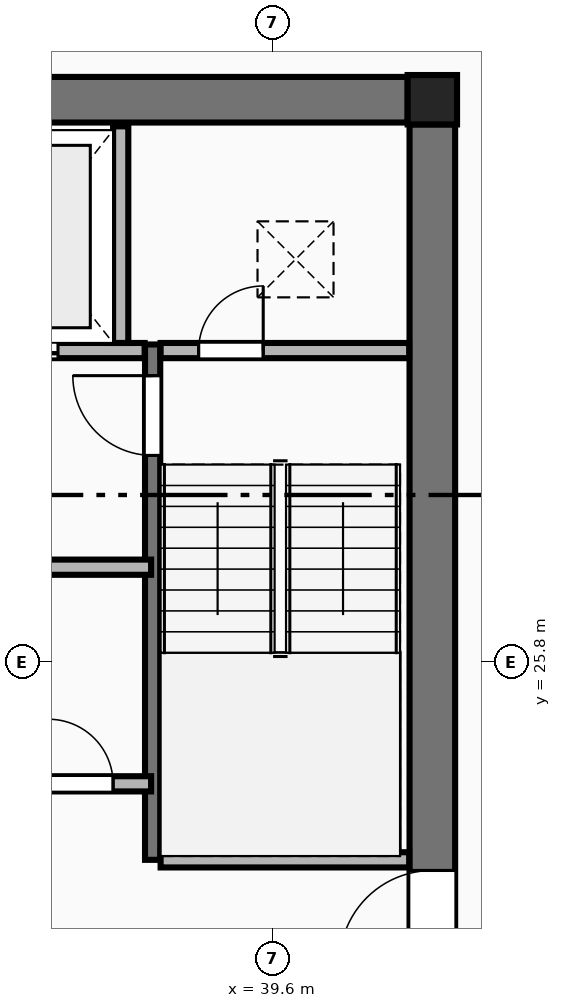
"""IFC4 building model, lengths in metres.
Left out: names, types, materials, properties, quantities, classifications, styles, units other than length and angle.
Written with IfcOpenShell. Run it as: python <this file> out.ifc"""

import sys

from ifc_helpers import new_model, si_unit, direction, frame, frame_2d, origin, origin_2d, place, context, subcontext, project, spatial, rectangle, extrude, element, fill, save


model = new_model("IFC4")
c1 = context("Model", 3, precision=1e-05, world=origin(), true_north=direction((0.0, 1.0)))
c2 = subcontext(c1, "Body", "Model", "MODEL_VIEW")
j1 = project(units=[si_unit("LENGTHUNIT", "METRE"), si_unit("PLANEANGLEUNIT", "RADIAN")], contexts=[c1])
p1 = place(None, origin())
s1 = spatial("IfcSite", under=j1, at=p1, CompositionType="ELEMENT")
p2 = place(p1, origin())
s2 = spatial("IfcBuilding", under=s1, at=p2, CompositionType="ELEMENT")
p3 = place(p2, frame((0.0, 0.0, 214.5)))
s3 = spatial("IfcBuildingStorey", under=s2, at=p3, CompositionType="ELEMENT", Elevation=214.5)
p4 = place(p3, frame((41.7, 33.2, 0.0), z_axis=(0.0, 0.0, 1.0), x_axis=(1.0, 0.0, 0.0)))
e1 = element("IfcColumn", 1, at=p4, inside=s3, PredefinedType="COLUMN", context=c2, shape_type="SweptSolid", body=[
    extrude(rectangle(XDim=0.65, YDim=0.65, at=origin_2d()), origin(), (0.0, 0.0, 1.0), 3.55),
])
p5 = place(p3, frame((23.425, 33.2, 0.0), z_axis=(0.0, 0.0, 1.0), x_axis=(1.0, 0.0, 0.0)))
e2 = element("IfcWall", 2, at=p5, inside=s3, PredefinedType="SHEAR", context=c2, shape_type="SweptSolid", body=[
    extrude(rectangle(XDim=17.95, YDim=0.6, at=frame_2d((8.975, 0.0))), origin(), (0.0, 0.0, 1.0), 3.35),
])
p6 = place(p3, frame((41.7, 18.925, 0.0), z_axis=(0.0, 0.0, 1.0), x_axis=(0.0, 1.0, 0.0)))
e3 = element("IfcWall", 3, at=p6, inside=s3, PredefinedType="SHEAR", context=c2, shape_type="SweptSolid", body=[
    extrude(rectangle(XDim=13.95, YDim=0.6, at=frame_2d((6.975, 0.0))), origin(), (0.0, 0.0, 1.0), 3.35),
])
p7 = place(p6, frame((2.915, 0.0, 0.0)))
e4 = element("IfcOpeningElement", 4, at=p7, cuts=e3, PredefinedType="OPENING", context=c2, shape_type="SweptSolid", body=[
    extrude(rectangle(XDim=1.22, YDim=2.25, at=frame_2d((0.61, 1.125))), frame((0.0, 0.31, 0.0), z_axis=(0.0, -1.0, 0.0), x_axis=(1.0, 0.0, 0.0)), (0.0, 0.0, 1.0), 0.62),
])
p8 = place(p3, frame((38.02, 23.2, 0.0), z_axis=(0.0, 0.0, 1.0), x_axis=(0.0, 1.0, 0.0)))
e5 = element("IfcWall", 5, at=p8, inside=s3, PredefinedType="SHEAR", context=c2, shape_type="SweptSolid", body=[
    extrude(rectangle(XDim=6.78, YDim=0.2, at=frame_2d((3.39, 0.0))), origin(), (0.0, 0.0, 1.0), 3.55),
])
p9 = place(p8, frame((5.32, 0.0, 0.0)))
e6 = element("IfcOpeningElement", 6, at=p9, cuts=e5, PredefinedType="OPENING", context=c2, shape_type="SweptSolid", body=[
    extrude(rectangle(XDim=1.05, YDim=2.15, at=frame_2d((0.525, 1.075))), frame((0.0, 0.11, 0.0), z_axis=(0.0, -1.0, 0.0), x_axis=(1.0, 0.0, 0.0)), (0.0, 0.0, 1.0), 0.22),
])
p10 = place(p3, frame((38.125, 23.2, 0.0), z_axis=(0.0, 0.0, 1.0), x_axis=(1.0, 0.0, 0.0)))
e7 = element("IfcWall", 7, at=p10, inside=s3, PredefinedType="PLUMBINGWALL", context=c2, shape_type="SweptSolid", body=[
    extrude(rectangle(XDim=3.27, YDim=0.2, at=frame_2d((1.635, 0.0))), origin(), (0.0, 0.0, 1.0), 3.35),
])
p11 = place(p3, frame((34.9, 29.9, 0.0), z_axis=(0.0, 0.0, 1.0), x_axis=(1.0, 0.0, 0.0)))
e8 = element("IfcWall", 8, at=p11, inside=s3, PredefinedType="PLUMBINGWALL", context=c2, shape_type="SweptSolid", body=[
    extrude(rectangle(XDim=3.015, YDim=0.2, at=frame_2d((1.508, 0.0))), origin(), (0.0, 0.0, 1.0), 3.35),
])
p12 = place(p11, frame((0.725, 0.0, 0.0)))
e9 = element("IfcOpeningElement", 9, at=p12, cuts=e8, PredefinedType="OPENING", context=c2, shape_type="SweptSolid", body=[
    extrude(rectangle(XDim=1.15, YDim=2.2, at=frame_2d((0.575, 1.1))), frame((0.0, 0.11, 0.0), z_axis=(0.0, -1.0, 0.0), x_axis=(1.0, 0.0, 0.0)), (0.0, 0.0, 1.0), 0.22),
])
p13 = place(p3, frame((38.125, 29.9, 0.0), z_axis=(0.0, 0.0, 1.0), x_axis=(1.0, 0.0, 0.0)))
e10 = element("IfcWall", 10, at=p13, inside=s3, PredefinedType="PLUMBINGWALL", context=c2, shape_type="SweptSolid", body=[
    extrude(rectangle(XDim=3.27, YDim=0.2, at=frame_2d((1.635, 0.0))), origin(), (0.0, 0.0, 1.0), 3.35),
])
p14 = place(p13, frame((0.5, 0.0, 0.0)))
e11 = element("IfcOpeningElement", 11, at=p14, cuts=e10, PredefinedType="OPENING", context=c2, shape_type="SweptSolid", body=[
    extrude(rectangle(XDim=0.85, YDim=2.05, at=frame_2d((0.425, 1.025))), frame((0.0, 0.11, 0.0), z_axis=(0.0, -1.0, 0.0), x_axis=(1.0, 0.0, 0.0)), (0.0, 0.0, 1.0), 0.22),
])
p15 = place(p3, frame((37.6, 30.0, 0.0), z_axis=(0.0, 0.0, 1.0), x_axis=(0.0, 1.0, 0.0)))
e12 = element("IfcWall", 12, at=p15, inside=s3, PredefinedType="PLUMBINGWALL", context=c2, shape_type="SweptSolid", body=[
    extrude(rectangle(XDim=2.85, YDim=0.2, at=frame_2d((1.425, 0.0))), origin(), (0.0, 0.0, 1.0), 3.35),
])
p16 = place(p3, frame((34.8, 27.05, 0.0), z_axis=(0.0, 0.0, 1.0), x_axis=(1.0, 0.0, 0.0)))
e13 = element("IfcWall", 13, at=p16, inside=s3, PredefinedType="PLUMBINGWALL", context=c2, shape_type="SweptSolid", body=[
    extrude(rectangle(XDim=3.2, YDim=0.2, at=frame_2d((1.6, 0.0))), origin(), (0.0, 0.0, 1.0), 3.35),
])
p17 = place(p3, frame((31.2, 24.2, 0.0), z_axis=(0.0, 0.0, 1.0), x_axis=(1.0, 0.0, 0.0)))
e14 = element("IfcWall", 14, at=p17, inside=s3, PredefinedType="PLUMBINGWALL", context=c2, shape_type="SweptSolid", body=[
    extrude(rectangle(XDim=6.8, YDim=0.2, at=frame_2d((3.4, 0.0))), origin(), (0.0, 0.0, 1.0), 3.35),
])
p18 = place(p17, frame((0.65, 0.0, 0.0)))
e15 = element("IfcOpeningElement", 15, at=p18, cuts=e14, PredefinedType="OPENING", context=c2, shape_type="SweptSolid", body=[
    extrude(rectangle(XDim=1.1, YDim=2.2, at=frame_2d((0.55, 1.1))), frame((0.0, 0.11, 0.0), z_axis=(0.0, -1.0, 0.0), x_axis=(1.0, 0.0, 0.0)), (0.0, 0.0, 1.0), 0.22),
])
p19 = place(p17, frame((2.55, 0.0, 0.0)))
e16 = element("IfcOpeningElement", 16, at=p19, cuts=e14, PredefinedType="OPENING", context=c2, shape_type="SweptSolid", body=[
    extrude(rectangle(XDim=0.85, YDim=2.05, at=frame_2d((0.425, 1.025))), frame((0.0, 0.11, 0.0), z_axis=(0.0, -1.0, 0.0), x_axis=(1.0, 0.0, 0.0)), (0.0, 0.0, 1.0), 0.22),
])
p20 = place(p17, frame((4.0, 0.0, 0.0)))
e17 = element("IfcOpeningElement", 17, at=p20, cuts=e14, PredefinedType="OPENING", context=c2, shape_type="SweptSolid", body=[
    extrude(rectangle(XDim=0.85, YDim=2.05, at=frame_2d((0.425, 1.025))), frame((0.0, 0.11, 0.0), z_axis=(0.0, -1.0, 0.0), x_axis=(1.0, 0.0, 0.0)), (0.0, 0.0, 1.0), 0.22),
])
p21 = place(p17, frame((5.45, 0.0, 0.0)))
e18 = element("IfcOpeningElement", 18, at=p21, cuts=e14, PredefinedType="OPENING", context=c2, shape_type="SweptSolid", body=[
    extrude(rectangle(XDim=0.85, YDim=2.05, at=frame_2d((0.425, 1.025))), frame((0.0, 0.11, 0.0), z_axis=(0.0, -1.0, 0.0), x_axis=(1.0, 0.0, 0.0)), (0.0, 0.0, 1.0), 0.22),
])
p22 = place(p7, origin())
e19 = element("IfcDoor", 19, at=p22, inside=s3, OperationType="SINGLE_SWING_LEFT", PredefinedType="DOOR", context=c2, shape_type="SweptSolid", body=[
    extrude(rectangle(XDim=1.22, YDim=2.25, at=frame_2d((0.61, 1.125))), frame((0.0, 0.025, 0.0), z_axis=(0.0, -1.0, 0.0), x_axis=(1.0, 0.0, 0.0)), (0.0, 0.0, 1.0), 0.05),
])
fill(e4, e19)
p23 = place(p9, origin())
e20 = element("IfcDoor", 20, at=p23, inside=s3, OperationType="SINGLE_SWING_RIGHT", PredefinedType="DOOR", context=c2, shape_type="SweptSolid", body=[
    extrude(rectangle(XDim=1.05, YDim=2.15, at=frame_2d((0.525, 1.075))), frame((0.0, 0.025, 0.0), z_axis=(0.0, -1.0, 0.0), x_axis=(1.0, 0.0, 0.0)), (0.0, 0.0, 1.0), 0.05),
])
fill(e6, e20)
p24 = place(p14, origin())
e21 = element("IfcDoor", 21, at=p24, inside=s3, OperationType="SINGLE_SWING_RIGHT", PredefinedType="DOOR", context=c2, shape_type="SweptSolid", body=[
    extrude(rectangle(XDim=0.85, YDim=2.05, at=frame_2d((0.425, 1.025))), frame((0.0, 0.025, 0.0), z_axis=(0.0, -1.0, 0.0), x_axis=(1.0, 0.0, 0.0)), (0.0, 0.0, 1.0), 0.05),
])
fill(e11, e21)
p25 = place(p12, origin())
e22 = element("IfcDoor", 22, at=p25, inside=s3, OperationType="DOUBLE_DOOR_SLIDING", PredefinedType="DOOR", context=c2, shape_type="SweptSolid", body=[
    extrude(rectangle(XDim=1.15, YDim=2.2, at=frame_2d((0.575, 1.1))), frame((0.0, 0.025, 0.0), z_axis=(0.0, -1.0, 0.0), x_axis=(1.0, 0.0, 0.0)), (0.0, 0.0, 1.0), 0.05),
])
fill(e9, e22)
p26 = place(p21, origin())
e23 = element("IfcDoor", 23, at=p26, inside=s3, OperationType="SINGLE_SWING_LEFT", PredefinedType="DOOR", context=c2, shape_type="SweptSolid", body=[
    extrude(rectangle(XDim=0.85, YDim=2.05, at=frame_2d((0.425, 1.025))), frame((0.0, 0.025, 0.0), z_axis=(0.0, -1.0, 0.0), x_axis=(1.0, 0.0, 0.0)), (0.0, 0.0, 1.0), 0.05),
])
fill(e18, e23)
save(model, sys.argv[1])
